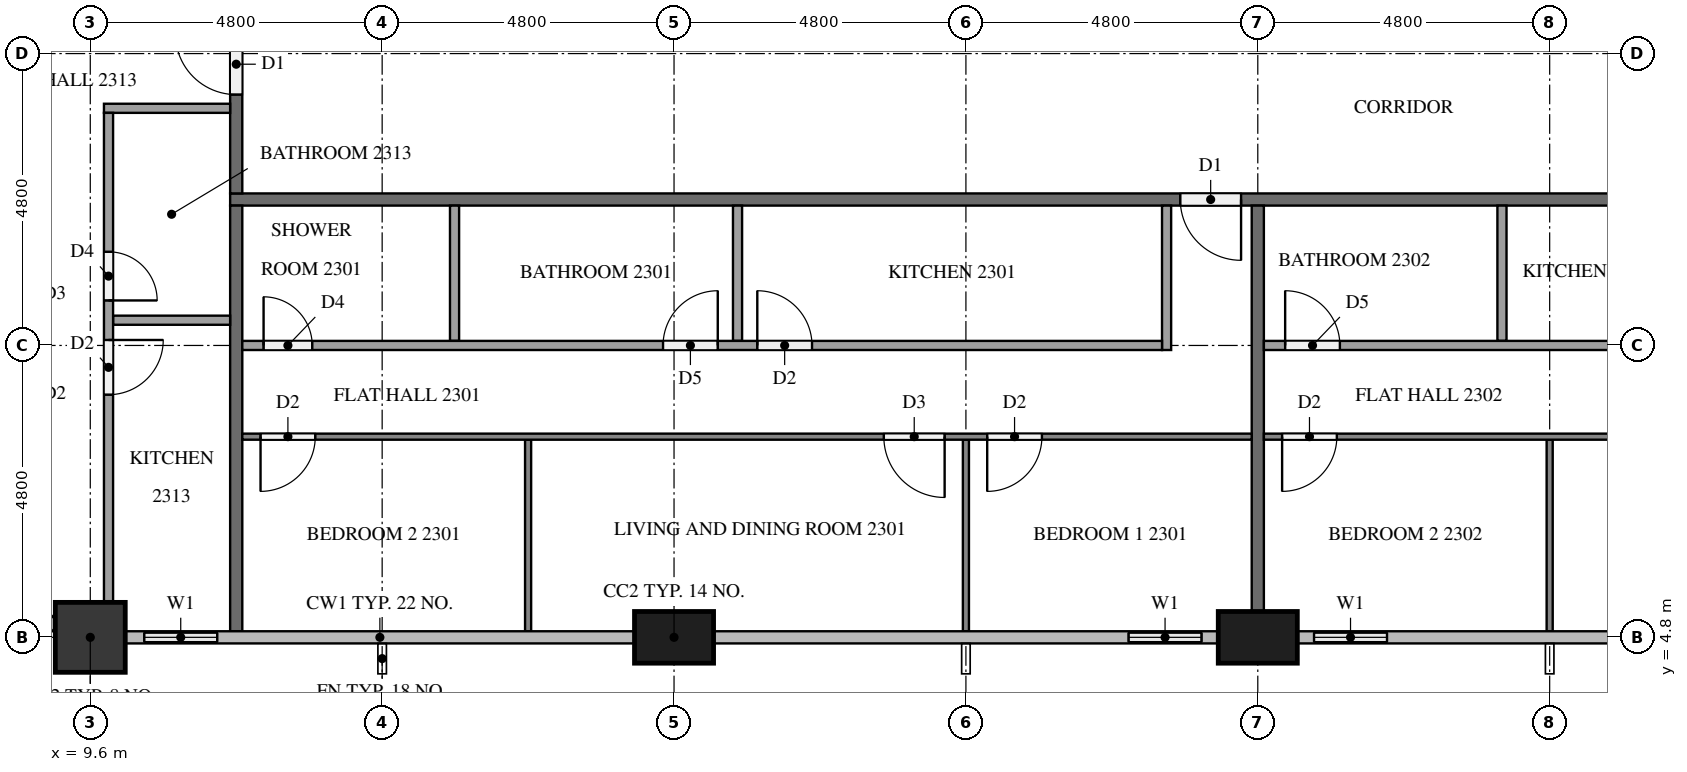
"""IFC4 building model, lengths in metres.
Left out: names, types, materials, properties, quantities, classifications, styles, units other than length and angle.
Written with IfcOpenShell. Run it as: python <this file> out.ifc"""

import sys

from ifc_helpers import new_model, si_unit, direction, frame, frame_2d, origin, origin_2d, place, context, subcontext, project, spatial, rectangle, extrude, element, fill, save


model = new_model("IFC4")
c1 = context("Model", 3, precision=1e-05, world=origin(), true_north=direction((0.0, 1.0)))
c2 = subcontext(c1, "Body", "Model", "MODEL_VIEW")
j1 = project(units=[si_unit("LENGTHUNIT", "METRE"), si_unit("PLANEANGLEUNIT", "RADIAN")], contexts=[c1])
p1 = place(None, origin())
s1 = spatial("IfcSite", under=j1, at=p1, CompositionType="ELEMENT")
p2 = place(p1, origin())
s2 = spatial("IfcBuilding", under=s1, at=p2, CompositionType="ELEMENT")
p3 = place(p2, frame((0.0, 0.0, 92.7)))
s3 = spatial("IfcBuildingStorey", under=s2, at=p3, CompositionType="ELEMENT", Elevation=92.7)
p4 = place(p3, frame((9.6, 4.8, 0.0), z_axis=(0.0, 0.0, 1.0), x_axis=(1.0, 0.0, 0.0)))
e1 = element("IfcColumn", 1, at=p4, inside=s3, PredefinedType="COLUMN", context=c2, shape_type="SweptSolid", body=[
    extrude(rectangle(XDim=1.15, YDim=1.15, at=origin_2d()), origin(), (0.0, 0.0, 1.0), 3.2),
])
for number, where, z_axis, x_axis in (
    (2, (19.2, 4.8, 0.0), (0.0, 0.0, 1.0), (1.0, 0.0, 0.0)),
    (3, (28.8, 4.8, 0.0), (0.0, 0.0, 1.0), (1.0, 0.0, 0.0)),
):
    element("IfcColumn", number, at=place(p3, frame(where, z_axis=z_axis, x_axis=x_axis)), inside=s3, PredefinedType="COLUMN", context=c2, shape_type="SweptSolid", body=[
        extrude(rectangle(XDim=1.3, YDim=0.85, at=origin_2d()), origin(), (0.0, 0.0, 1.0), 3.2),
    ])
p5 = place(p3, frame((10.175, 4.8, 0.0), z_axis=(0.0, 0.0, 1.0), x_axis=(1.0, 0.0, 0.0)))
e4 = element("IfcWall", 4, at=p5, inside=s3, PredefinedType="SOLIDWALL", context=c2, shape_type="SweptSolid", body=[
    extrude(rectangle(XDim=1.825, YDim=0.15, at=frame_2d((0.913, 0.0))), origin(), (0.0, 0.0, 1.0), 3.2),
])
p6 = place(p5, frame((0.312, 0.0, 0.9)))
e5 = element("IfcOpeningElement", 5, at=p6, cuts=e4, PredefinedType="OPENING", context=c2, shape_type="SweptSolid", body=[
    extrude(rectangle(XDim=1.2, YDim=1.4, at=frame_2d((0.6, 0.7))), frame((0.0, 0.085, 0.0), z_axis=(0.0, -1.0, 0.0), x_axis=(1.0, 0.0, 0.0)), (0.0, 0.0, 1.0), 0.17),
])
p7 = place(p3, frame((26.4, 4.8, 0.0), z_axis=(0.0, 0.0, 1.0), x_axis=(1.0, 0.0, 0.0)))
e6 = element("IfcWall", 6, at=p7, inside=s3, PredefinedType="SOLIDWALL", context=c2, shape_type="SweptSolid", body=[
    extrude(rectangle(XDim=1.75, YDim=0.15, at=frame_2d((0.875, 0.0))), origin(), (0.0, 0.0, 1.0), 3.2),
])
p8 = place(p7, frame((0.275, 0.0, 0.9)))
e7 = element("IfcOpeningElement", 7, at=p8, cuts=e6, PredefinedType="OPENING", context=c2, shape_type="SweptSolid", body=[
    extrude(rectangle(XDim=1.2, YDim=1.4, at=frame_2d((0.6, 0.7))), frame((0.0, 0.085, 0.0), z_axis=(0.0, -1.0, 0.0), x_axis=(1.0, 0.0, 0.0)), (0.0, 0.0, 1.0), 0.17),
])
p9 = place(p3, frame((29.45, 4.8, 0.0), z_axis=(0.0, 0.0, 1.0), x_axis=(1.0, 0.0, 0.0)))
e8 = element("IfcWall", 8, at=p9, inside=s3, PredefinedType="SOLIDWALL", context=c2, shape_type="SweptSolid", body=[
    extrude(rectangle(XDim=1.75, YDim=0.15, at=frame_2d((0.875, 0.0))), origin(), (0.0, 0.0, 1.0), 3.2),
])
p10 = place(p9, frame((0.275, 0.0, 0.9)))
e9 = element("IfcOpeningElement", 9, at=p10, cuts=e8, PredefinedType="OPENING", context=c2, shape_type="SweptSolid", body=[
    extrude(rectangle(XDim=1.2, YDim=1.4, at=frame_2d((0.6, 0.7))), frame((0.0, 0.085, 0.0), z_axis=(0.0, -1.0, 0.0), x_axis=(1.0, 0.0, 0.0)), (0.0, 0.0, 1.0), 0.17),
])
p11 = place(p3, frame((50.5, 12.0, 0.0), z_axis=(0.0, 0.0, 1.0), x_axis=(-1.0, 0.0, 0.0)))
e10 = element("IfcWall", 10, at=p11, inside=s3, PredefinedType="PARTITIONING", context=c2, shape_type="SweptSolid", body=[
    extrude(rectangle(XDim=38.6, YDim=0.2, at=frame_2d((19.3, 0.0))), origin(), (0.0, 0.0, 1.0), 3.2),
])
p12 = place(p11, frame((21.975, 0.0, 0.0)))
e11 = element("IfcOpeningElement", 11, at=p12, cuts=e10, PredefinedType="OPENING", context=c2, shape_type="SweptSolid", body=[
    extrude(rectangle(XDim=1.0, YDim=2.1, at=frame_2d((0.5, 1.05))), frame((0.0, 0.11, 0.0), z_axis=(0.0, -1.0, 0.0), x_axis=(1.0, 0.0, 0.0)), (0.0, 0.0, 1.0), 0.22),
])
p13 = place(p11, frame((7.575, 0.0, 0.0)))
e12 = element("IfcOpeningElement", 12, at=p13, cuts=e10, PredefinedType="OPENING", context=c2, shape_type="SweptSolid", body=[
    extrude(rectangle(XDim=1.0, YDim=2.1, at=frame_2d((0.5, 1.05))), frame((0.0, 0.11, 0.0), z_axis=(0.0, -1.0, 0.0), x_axis=(1.0, 0.0, 0.0)), (0.0, 0.0, 1.0), 0.22),
])
p14 = place(p11, frame((0.375, 0.0, 0.0)))
e13 = element("IfcOpeningElement", 13, at=p14, cuts=e10, PredefinedType="OPENING", context=c2, shape_type="SweptSolid", body=[
    extrude(rectangle(XDim=1.0, YDim=2.1, at=frame_2d((0.5, 1.05))), frame((0.0, 0.11, 0.0), z_axis=(0.0, -1.0, 0.0), x_axis=(1.0, 0.0, 0.0)), (0.0, 0.0, 1.0), 0.22),
])
p15 = place(p3, frame((12.0, 12.1, 0.0), z_axis=(0.0, 0.0, 1.0), x_axis=(0.0, 1.0, 0.0)))
e14 = element("IfcWall", 14, at=p15, inside=s3, PredefinedType="PARTITIONING", context=c2, shape_type="SweptSolid", body=[
    extrude(rectangle(XDim=2.8, YDim=0.2, at=frame_2d((1.4, 0.0))), origin(), (0.0, 0.0, 1.0), 3.2),
])
p16 = place(p15, frame((1.625, 0.0, 0.0)))
e15 = element("IfcOpeningElement", 15, at=p16, cuts=e14, PredefinedType="OPENING", context=c2, shape_type="SweptSolid", body=[
    extrude(rectangle(XDim=1.0, YDim=2.1, at=frame_2d((0.5, 1.05))), frame((0.0, 0.11, 0.0), z_axis=(0.0, -1.0, 0.0), x_axis=(1.0, 0.0, 0.0)), (0.0, 0.0, 1.0), 0.22),
])
p17 = place(p3, frame((28.8, 11.9, 0.0), z_axis=(0.0, 0.0, 1.0), x_axis=(0.0, -1.0, 0.0)))
e16 = element("IfcWall", 16, at=p17, inside=s3, PredefinedType="PARTITIONING", context=c2, shape_type="SweptSolid", body=[
    extrude(rectangle(XDim=6.675, YDim=0.2, at=frame_2d((3.337, 0.0))), origin(), (0.0, 0.0, 1.0), 3.2),
])
p18 = place(p3, frame((12.0, 4.9, 0.0), z_axis=(0.0, 0.0, 1.0), x_axis=(0.0, 1.0, 0.0)))
e17 = element("IfcWall", 17, at=p18, inside=s3, PredefinedType="PARTITIONING", context=c2, shape_type="SweptSolid", body=[
    extrude(rectangle(XDim=7.0, YDim=0.2, at=frame_2d((3.5, 0.0))), origin(), (0.0, 0.0, 1.0), 3.2),
])
for number, where, z_axis, x_axis in (
    (18, (24.0, 8.05, 0.0), (0.0, 0.0, 1.0), (0.0, -1.0, 0.0)),
    (19, (16.8, 8.05, 0.0), (0.0, 0.0, 1.0), (0.0, -1.0, 0.0)),
):
    element("IfcWall", number, at=place(p3, frame(where, z_axis=z_axis, x_axis=x_axis)), inside=s3, PredefinedType="PARTITIONING", context=c2, shape_type="SweptSolid", body=[
        extrude(rectangle(XDim=3.15, YDim=0.1, at=frame_2d((1.575, 0.0))), origin(), (0.0, 0.0, 1.0), 3.2),
    ])
p19 = place(p3, frame((28.7, 8.1, 0.0), z_axis=(0.0, 0.0, 1.0), x_axis=(-1.0, 0.0, 0.0)))
e20 = element("IfcWall", 20, at=p19, inside=s3, PredefinedType="PARTITIONING", context=c2, shape_type="SweptSolid", body=[
    extrude(rectangle(XDim=16.6, YDim=0.1, at=frame_2d((8.3, 0.0))), origin(), (0.0, 0.0, 1.0), 3.2),
])
p20 = place(p19, frame((3.45, 0.0, 0.0)))
e21 = element("IfcOpeningElement", 21, at=p20, cuts=e20, PredefinedType="OPENING", context=c2, shape_type="SweptSolid", body=[
    extrude(rectangle(XDim=0.9, YDim=2.1, at=frame_2d((0.45, 1.05))), frame((0.0, 0.06, 0.0), z_axis=(0.0, -1.0, 0.0), x_axis=(1.0, 0.0, 0.0)), (0.0, 0.0, 1.0), 0.12),
])
p21 = place(p19, frame((5.05, 0.0, 0.0)))
e22 = element("IfcOpeningElement", 22, at=p21, cuts=e20, PredefinedType="OPENING", context=c2, shape_type="SweptSolid", body=[
    extrude(rectangle(XDim=1.0, YDim=2.1, at=frame_2d((0.5, 1.05))), frame((0.0, 0.06, 0.0), z_axis=(0.0, -1.0, 0.0), x_axis=(1.0, 0.0, 0.0)), (0.0, 0.0, 1.0), 0.12),
])
p22 = place(p19, frame((15.4, 0.0, 0.0)))
e23 = element("IfcOpeningElement", 23, at=p22, cuts=e20, PredefinedType="OPENING", context=c2, shape_type="SweptSolid", body=[
    extrude(rectangle(XDim=0.9, YDim=2.1, at=frame_2d((0.45, 1.05))), frame((0.0, 0.06, 0.0), z_axis=(0.0, -1.0, 0.0), x_axis=(1.0, 0.0, 0.0)), (0.0, 0.0, 1.0), 0.12),
])
for number, where, z_axis, x_axis in (
    (24, (20.244, 11.9, 0.0), (0.0, 0.0, 1.0), (0.0, -1.0, 0.0)),
    (25, (15.59, 11.9, 0.0), (0.0, 0.0, 1.0), (0.0, -1.0, 0.0)),
):
    element("IfcWall", number, at=place(p3, frame(where, z_axis=z_axis, x_axis=x_axis)), inside=s3, PredefinedType="PARTITIONING", context=c2, shape_type="SweptSolid", body=[
        extrude(rectangle(XDim=2.225, YDim=0.15, at=frame_2d((1.112, 0.0))), origin(), (0.0, 0.0, 1.0), 3.2),
    ])
p23 = place(p3, frame((27.3, 11.9, 0.0), z_axis=(0.0, 0.0, 1.0), x_axis=(0.0, -1.0, 0.0)))
e26 = element("IfcWall", 26, at=p23, inside=s3, PredefinedType="PARTITIONING", context=c2, shape_type="SweptSolid", body=[
    extrude(rectangle(XDim=2.375, YDim=0.15, at=frame_2d((1.188, 0.0))), origin(), (0.0, 0.0, 1.0), 3.2),
])
p24 = place(p3, frame((12.1, 9.6, 0.0), z_axis=(0.0, 0.0, 1.0), x_axis=(1.0, 0.0, 0.0)))
e27 = element("IfcWall", 27, at=p24, inside=s3, PredefinedType="PARTITIONING", context=c2, shape_type="SweptSolid", body=[
    extrude(rectangle(XDim=15.125, YDim=0.15, at=frame_2d((7.562, 0.0))), origin(), (0.0, 0.0, 1.0), 3.2),
])
p25 = place(p24, frame((8.469, 0.0, 0.0)))
e28 = element("IfcOpeningElement", 28, at=p25, cuts=e27, PredefinedType="OPENING", context=c2, shape_type="SweptSolid", body=[
    extrude(rectangle(XDim=0.9, YDim=2.1, at=frame_2d((0.45, 1.05))), frame((0.0, 0.085, 0.0), z_axis=(0.0, -1.0, 0.0), x_axis=(1.0, 0.0, 0.0)), (0.0, 0.0, 1.0), 0.17),
])
p26 = place(p24, frame((6.919, 0.0, 0.0)))
e29 = element("IfcOpeningElement", 29, at=p26, cuts=e27, PredefinedType="OPENING", context=c2, shape_type="SweptSolid", body=[
    extrude(rectangle(XDim=0.9, YDim=2.1, at=frame_2d((0.45, 1.05))), frame((0.0, 0.085, 0.0), z_axis=(0.0, -1.0, 0.0), x_axis=(1.0, 0.0, 0.0)), (0.0, 0.0, 1.0), 0.17),
])
p27 = place(p24, frame((0.35, 0.0, 0.0)))
e30 = element("IfcOpeningElement", 30, at=p27, cuts=e27, PredefinedType="OPENING", context=c2, shape_type="SweptSolid", body=[
    extrude(rectangle(XDim=0.8, YDim=2.1, at=frame_2d((0.4, 1.05))), frame((0.0, 0.085, 0.0), z_axis=(0.0, -1.0, 0.0), x_axis=(1.0, 0.0, 0.0)), (0.0, 0.0, 1.0), 0.17),
])
p28 = place(p3, frame((33.6, 8.05, 0.0), z_axis=(0.0, 0.0, 1.0), x_axis=(0.0, -1.0, 0.0)))
e31 = element("IfcWall", 31, at=p28, inside=s3, PredefinedType="PARTITIONING", context=c2, shape_type="SweptSolid", body=[
    extrude(rectangle(XDim=3.15, YDim=0.1, at=frame_2d((1.575, 0.0))), origin(), (0.0, 0.0, 1.0), 3.2),
])
p29 = place(p3, frame((43.1, 8.1, 0.0), z_axis=(0.0, 0.0, 1.0), x_axis=(-1.0, 0.0, 0.0)))
e32 = element("IfcWall", 32, at=p29, inside=s3, PredefinedType="PARTITIONING", context=c2, shape_type="SweptSolid", body=[
    extrude(rectangle(XDim=14.2, YDim=0.1, at=frame_2d((7.1, 0.0))), origin(), (0.0, 0.0, 1.0), 3.2),
])
p30 = place(p29, frame((3.35, 0.0, 0.0)))
e33 = element("IfcOpeningElement", 33, at=p30, cuts=e32, PredefinedType="OPENING", context=c2, shape_type="SweptSolid", body=[
    extrude(rectangle(XDim=1.0, YDim=2.1, at=frame_2d((0.5, 1.05))), frame((0.0, 0.06, 0.0), z_axis=(0.0, -1.0, 0.0), x_axis=(1.0, 0.0, 0.0)), (0.0, 0.0, 1.0), 0.12),
])
p31 = place(p29, frame((5.05, 0.0, 0.0)))
e34 = element("IfcOpeningElement", 34, at=p31, cuts=e32, PredefinedType="OPENING", context=c2, shape_type="SweptSolid", body=[
    extrude(rectangle(XDim=0.9, YDim=2.1, at=frame_2d((0.45, 1.05))), frame((0.0, 0.06, 0.0), z_axis=(0.0, -1.0, 0.0), x_axis=(1.0, 0.0, 0.0)), (0.0, 0.0, 1.0), 0.12),
])
p32 = place(p29, frame((13.0, 0.0, 0.0)))
e35 = element("IfcOpeningElement", 35, at=p32, cuts=e32, PredefinedType="OPENING", context=c2, shape_type="SweptSolid", body=[
    extrude(rectangle(XDim=0.9, YDim=2.1, at=frame_2d((0.45, 1.05))), frame((0.0, 0.06, 0.0), z_axis=(0.0, -1.0, 0.0), x_axis=(1.0, 0.0, 0.0)), (0.0, 0.0, 1.0), 0.12),
])
p33 = place(p3, frame((32.815, 11.9, 0.0), z_axis=(0.0, 0.0, 1.0), x_axis=(0.0, -1.0, 0.0)))
e36 = element("IfcWall", 36, at=p33, inside=s3, PredefinedType="PARTITIONING", context=c2, shape_type="SweptSolid", body=[
    extrude(rectangle(XDim=2.225, YDim=0.15, at=frame_2d((1.112, 0.0))), origin(), (0.0, 0.0, 1.0), 3.2),
])
p34 = place(p3, frame((28.9, 9.6, 0.0), z_axis=(0.0, 0.0, 1.0), x_axis=(1.0, 0.0, 0.0)))
e37 = element("IfcWall", 37, at=p34, inside=s3, PredefinedType="PARTITIONING", context=c2, shape_type="SweptSolid", body=[
    extrude(rectangle(XDim=12.725, YDim=0.15, at=frame_2d((6.363, 0.0))), origin(), (0.0, 0.0, 1.0), 3.2),
])
p35 = place(p34, frame((10.114, 0.0, 0.0)))
e38 = element("IfcOpeningElement", 38, at=p35, cuts=e37, PredefinedType="OPENING", context=c2, shape_type="SweptSolid", body=[
    extrude(rectangle(XDim=0.8, YDim=2.1, at=frame_2d((0.4, 1.05))), frame((0.0, 0.085, 0.0), z_axis=(0.0, -1.0, 0.0), x_axis=(1.0, 0.0, 0.0)), (0.0, 0.0, 1.0), 0.17),
])
p36 = place(p34, frame((8.563, 0.0, 0.0)))
e39 = element("IfcOpeningElement", 39, at=p36, cuts=e37, PredefinedType="OPENING", context=c2, shape_type="SweptSolid", body=[
    extrude(rectangle(XDim=0.9, YDim=2.1, at=frame_2d((0.45, 1.05))), frame((0.0, 0.085, 0.0), z_axis=(0.0, -1.0, 0.0), x_axis=(1.0, 0.0, 0.0)), (0.0, 0.0, 1.0), 0.17),
])
p37 = place(p34, frame((0.35, 0.0, 0.0)))
e40 = element("IfcOpeningElement", 40, at=p37, cuts=e37, PredefinedType="OPENING", context=c2, shape_type="SweptSolid", body=[
    extrude(rectangle(XDim=0.9, YDim=2.1, at=frame_2d((0.45, 1.05))), frame((0.0, 0.085, 0.0), z_axis=(0.0, -1.0, 0.0), x_axis=(1.0, 0.0, 0.0)), (0.0, 0.0, 1.0), 0.17),
])
p38 = place(p3, frame((11.9, 10.015, 0.0), z_axis=(0.0, 0.0, 1.0), x_axis=(-1.0, 0.0, 0.0)))
e41 = element("IfcWall", 41, at=p38, inside=s3, PredefinedType="PARTITIONING", context=c2, shape_type="SweptSolid", body=[
    extrude(rectangle(XDim=1.925, YDim=0.15, at=frame_2d((0.962, 0.0))), origin(), (0.0, 0.0, 1.0), 3.2),
])
p39 = place(p3, frame((11.9, 13.5, 0.0), z_axis=(0.0, 0.0, 1.0), x_axis=(-1.0, 0.0, 0.0)))
e42 = element("IfcWall", 42, at=p39, inside=s3, PredefinedType="PARTITIONING", context=c2, shape_type="SweptSolid", body=[
    extrude(rectangle(XDim=2.075, YDim=0.15, at=frame_2d((1.038, 0.0))), origin(), (0.0, 0.0, 1.0), 3.2),
])
p40 = place(p3, frame((9.9, 13.425, 0.0), z_axis=(0.0, 0.0, 1.0), x_axis=(0.0, -1.0, 0.0)))
e43 = element("IfcWall", 43, at=p40, inside=s3, PredefinedType="PARTITIONING", context=c2, shape_type="SweptSolid", body=[
    extrude(rectangle(XDim=8.05, YDim=0.15, at=frame_2d((4.025, 0.0))), origin(), (0.0, 0.0, 1.0), 3.2),
])
p41 = place(p40, frame((2.285, 0.0, 0.0)))
e44 = element("IfcOpeningElement", 44, at=p41, cuts=e43, PredefinedType="OPENING", context=c2, shape_type="SweptSolid", body=[
    extrude(rectangle(XDim=0.8, YDim=2.1, at=frame_2d((0.4, 1.05))), frame((0.0, 0.085, 0.0), z_axis=(0.0, -1.0, 0.0), x_axis=(1.0, 0.0, 0.0)), (0.0, 0.0, 1.0), 0.17),
])
p42 = place(p40, frame((3.735, 0.0, 0.0)))
e45 = element("IfcOpeningElement", 45, at=p42, cuts=e43, PredefinedType="OPENING", context=c2, shape_type="SweptSolid", body=[
    extrude(rectangle(XDim=0.9, YDim=2.1, at=frame_2d((0.45, 1.05))), frame((0.0, 0.085, 0.0), z_axis=(0.0, -1.0, 0.0), x_axis=(1.0, 0.0, 0.0)), (0.0, 0.0, 1.0), 0.17),
])
p43 = place(p6, origin())
e46 = element("IfcWindow", 46, at=p43, inside=s3, PartitioningType="SINGLE_PANEL", PredefinedType="WINDOW", context=c2, shape_type="SweptSolid", body=[
    extrude(rectangle(XDim=1.2, YDim=1.4, at=frame_2d((0.6, 0.7))), frame((0.0, 0.03, 0.0), z_axis=(0.0, -1.0, 0.0), x_axis=(1.0, 0.0, 0.0)), (0.0, 0.0, 1.0), 0.06),
])
fill(e5, e46)
p44 = place(p8, origin())
e47 = element("IfcWindow", 47, at=p44, inside=s3, PartitioningType="SINGLE_PANEL", PredefinedType="WINDOW", context=c2, shape_type="SweptSolid", body=[
    extrude(rectangle(XDim=1.2, YDim=1.4, at=frame_2d((0.6, 0.7))), frame((0.0, 0.03, 0.0), z_axis=(0.0, -1.0, 0.0), x_axis=(1.0, 0.0, 0.0)), (0.0, 0.0, 1.0), 0.06),
])
fill(e7, e47)
p45 = place(p10, origin())
e48 = element("IfcWindow", 48, at=p45, inside=s3, PartitioningType="SINGLE_PANEL", PredefinedType="WINDOW", context=c2, shape_type="SweptSolid", body=[
    extrude(rectangle(XDim=1.2, YDim=1.4, at=frame_2d((0.6, 0.7))), frame((0.0, 0.03, 0.0), z_axis=(0.0, -1.0, 0.0), x_axis=(1.0, 0.0, 0.0)), (0.0, 0.0, 1.0), 0.06),
])
fill(e9, e48)
p46 = place(p12, origin())
e49 = element("IfcDoor", 49, at=p46, inside=s3, OperationType="SINGLE_SWING_LEFT", PredefinedType="DOOR", context=c2, shape_type="SweptSolid", body=[
    extrude(rectangle(XDim=1.0, YDim=2.1, at=frame_2d((0.5, 1.05))), frame((0.0, 0.025, 0.0), z_axis=(0.0, -1.0, 0.0), x_axis=(1.0, 0.0, 0.0)), (0.0, 0.0, 1.0), 0.05),
])
fill(e11, e49)
p47 = place(p16, origin())
e50 = element("IfcDoor", 50, at=p47, inside=s3, OperationType="SINGLE_SWING_RIGHT", PredefinedType="DOOR", context=c2, shape_type="SweptSolid", body=[
    extrude(rectangle(XDim=1.0, YDim=2.1, at=frame_2d((0.5, 1.05))), frame((0.0, 0.025, 0.0), z_axis=(0.0, -1.0, 0.0), x_axis=(1.0, 0.0, 0.0)), (0.0, 0.0, 1.0), 0.05),
])
fill(e15, e50)
p48 = place(p20, origin())
e51 = element("IfcDoor", 51, at=p48, inside=s3, OperationType="SINGLE_SWING_RIGHT", PredefinedType="DOOR", context=c2, shape_type="SweptSolid", body=[
    extrude(rectangle(XDim=0.9, YDim=2.1, at=frame_2d((0.45, 1.05))), frame((0.0, 0.025, 0.0), z_axis=(0.0, -1.0, 0.0), x_axis=(1.0, 0.0, 0.0)), (0.0, 0.0, 1.0), 0.05),
])
fill(e21, e51)
p49 = place(p21, origin())
e52 = element("IfcDoor", 52, at=p49, inside=s3, OperationType="SINGLE_SWING_LEFT", PredefinedType="DOOR", context=c2, shape_type="SweptSolid", body=[
    extrude(rectangle(XDim=1.0, YDim=2.1, at=frame_2d((0.5, 1.05))), frame((0.0, 0.025, 0.0), z_axis=(0.0, -1.0, 0.0), x_axis=(1.0, 0.0, 0.0)), (0.0, 0.0, 1.0), 0.05),
])
fill(e22, e52)
p50 = place(p22, origin())
e53 = element("IfcDoor", 53, at=p50, inside=s3, OperationType="SINGLE_SWING_RIGHT", PredefinedType="DOOR", context=c2, shape_type="SweptSolid", body=[
    extrude(rectangle(XDim=0.9, YDim=2.1, at=frame_2d((0.45, 1.05))), frame((0.0, 0.025, 0.0), z_axis=(0.0, -1.0, 0.0), x_axis=(1.0, 0.0, 0.0)), (0.0, 0.0, 1.0), 0.05),
])
fill(e23, e53)
p51 = place(p25, origin())
e54 = element("IfcDoor", 54, at=p51, inside=s3, OperationType="SINGLE_SWING_LEFT", PredefinedType="DOOR", context=c2, shape_type="SweptSolid", body=[
    extrude(rectangle(XDim=0.9, YDim=2.1, at=frame_2d((0.45, 1.05))), frame((0.0, 0.025, 0.0), z_axis=(0.0, -1.0, 0.0), x_axis=(1.0, 0.0, 0.0)), (0.0, 0.0, 1.0), 0.05),
])
fill(e28, e54)
p52 = place(p26, origin())
e55 = element("IfcDoor", 55, at=p52, inside=s3, OperationType="SINGLE_SWING_RIGHT", PredefinedType="DOOR", context=c2, shape_type="SweptSolid", body=[
    extrude(rectangle(XDim=0.9, YDim=2.1, at=frame_2d((0.45, 1.05))), frame((0.0, 0.025, 0.0), z_axis=(0.0, -1.0, 0.0), x_axis=(1.0, 0.0, 0.0)), (0.0, 0.0, 1.0), 0.05),
])
fill(e29, e55)
p53 = place(p27, origin())
e56 = element("IfcDoor", 56, at=p53, inside=s3, OperationType="SINGLE_SWING_LEFT", PredefinedType="DOOR", context=c2, shape_type="SweptSolid", body=[
    extrude(rectangle(XDim=0.8, YDim=2.1, at=frame_2d((0.4, 1.05))), frame((0.0, 0.025, 0.0), z_axis=(0.0, -1.0, 0.0), x_axis=(1.0, 0.0, 0.0)), (0.0, 0.0, 1.0), 0.05),
])
fill(e30, e56)
p54 = place(p32, origin())
e57 = element("IfcDoor", 57, at=p54, inside=s3, OperationType="SINGLE_SWING_RIGHT", PredefinedType="DOOR", context=c2, shape_type="SweptSolid", body=[
    extrude(rectangle(XDim=0.9, YDim=2.1, at=frame_2d((0.45, 1.05))), frame((0.0, 0.025, 0.0), z_axis=(0.0, -1.0, 0.0), x_axis=(1.0, 0.0, 0.0)), (0.0, 0.0, 1.0), 0.05),
])
fill(e35, e57)
p55 = place(p37, origin())
e58 = element("IfcDoor", 58, at=p55, inside=s3, OperationType="SINGLE_SWING_LEFT", PredefinedType="DOOR", context=c2, shape_type="SweptSolid", body=[
    extrude(rectangle(XDim=0.9, YDim=2.1, at=frame_2d((0.45, 1.05))), frame((0.0, 0.025, 0.0), z_axis=(0.0, -1.0, 0.0), x_axis=(1.0, 0.0, 0.0)), (0.0, 0.0, 1.0), 0.05),
])
fill(e40, e58)
p56 = place(p41, origin())
e59 = element("IfcDoor", 59, at=p56, inside=s3, OperationType="SINGLE_SWING_RIGHT", PredefinedType="DOOR", context=c2, shape_type="SweptSolid", body=[
    extrude(rectangle(XDim=0.8, YDim=2.1, at=frame_2d((0.4, 1.05))), frame((0.0, 0.025, 0.0), z_axis=(0.0, -1.0, 0.0), x_axis=(1.0, 0.0, 0.0)), (0.0, 0.0, 1.0), 0.05),
])
fill(e44, e59)
p57 = place(p42, origin())
e60 = element("IfcDoor", 60, at=p57, inside=s3, OperationType="SINGLE_SWING_LEFT", PredefinedType="DOOR", context=c2, shape_type="SweptSolid", body=[
    extrude(rectangle(XDim=0.9, YDim=2.1, at=frame_2d((0.45, 1.05))), frame((0.0, 0.025, 0.0), z_axis=(0.0, -1.0, 0.0), x_axis=(1.0, 0.0, 0.0)), (0.0, 0.0, 1.0), 0.05),
])
fill(e45, e60)
save(model, sys.argv[1])
